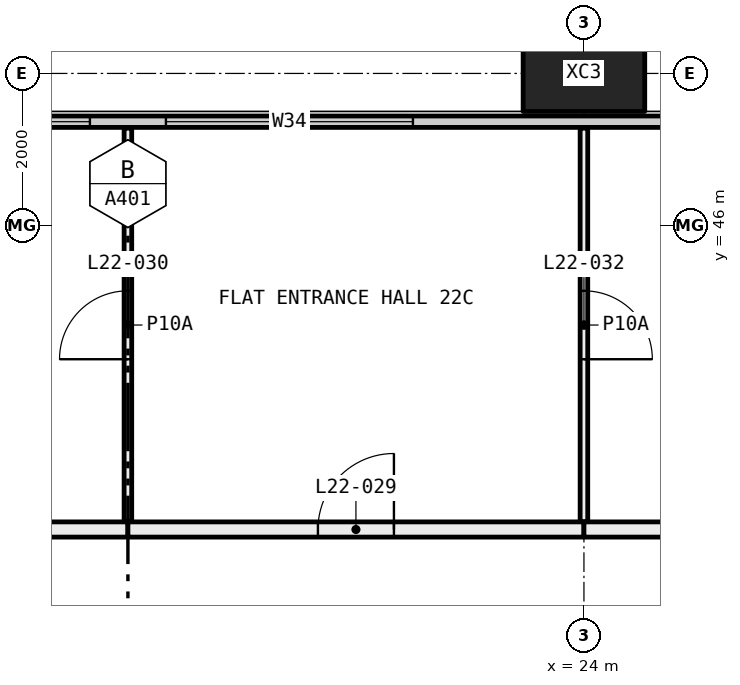
"""IFC4 building model, lengths in metres.
Left out: names, types, materials, properties, quantities, classifications, styles, units other than length and angle.
Written with IfcOpenShell. Run it as: python <this file> out.ifc"""

import sys

from ifc_helpers import new_model, si_unit, direction, frame, frame_2d, origin, origin_2d, place, context, subcontext, project, spatial, rectangle, hollow_rectangle, extrude, element, fill, save


model = new_model("IFC4")
c1 = context("Model", 3, precision=1e-05, world=origin(), true_north=direction((0.0, 1.0)))
c2 = subcontext(c1, "Body", "Model", "MODEL_VIEW")
j1 = project(units=[si_unit("LENGTHUNIT", "METRE"), si_unit("PLANEANGLEUNIT", "RADIAN")], contexts=[c1])
p1 = place(None, origin())
s1 = spatial("IfcSite", under=j1, at=p1, CompositionType="ELEMENT")
p2 = place(p1, origin())
s2 = spatial("IfcBuilding", under=s1, at=p2, CompositionType="ELEMENT")
p3 = place(p2, frame((0.0, 0.0, 88.65)))
s3 = spatial("IfcBuildingStorey", under=s2, at=p3, CompositionType="ELEMENT", Elevation=88.65)
p4 = place(p3, frame((24.0, 48.0, -0.4), z_axis=(0.0, 0.0, 1.0), x_axis=(1.0, 0.0, 0.0)))
e1 = element("IfcColumn", 1, at=p4, inside=s3, PredefinedType="COLUMN", context=c2, shape_type="SweptSolid", body=[
    extrude(hollow_rectangle(XDim=1.6, YDim=1.0, WallThickness=0.065, at=origin_2d()), origin(), (0.0, 0.0, 1.0), 3.45),
])
p5 = place(p3, frame((6.56, 47.365, 0.0), z_axis=(0.0, 0.0, 1.0), x_axis=(1.0, 0.0, 0.0)))
e2 = element("IfcWall", 2, at=p5, inside=s3, PredefinedType="ELEMENTEDWALL", context=c2, shape_type="SweptSolid", body=[
    extrude(rectangle(XDim=58.88, YDim=0.15, at=frame_2d((29.44, 0.0))), origin(), (0.0, 0.0, 1.0), 3.05),
])
p6 = place(p5, frame((0.44, 0.0, 0.45)))
e3 = element("IfcOpeningElement", 3, at=p6, cuts=e2, PredefinedType="OPENING", context=c2, shape_type="SweptSolid", body=[
    extrude(rectangle(XDim=4.5, YDim=2.55, at=frame_2d((2.25, 1.275))), frame((0.0, 0.085, 0.0), z_axis=(0.0, -1.0, 0.0), x_axis=(1.0, 0.0, 0.0)), (0.0, 0.0, 1.0), 0.17),
])
p7 = place(p5, frame((7.69, 0.0, 0.45)))
e4 = element("IfcOpeningElement", 4, at=p7, cuts=e2, PredefinedType="OPENING", context=c2, shape_type="SweptSolid", body=[
    extrude(rectangle(XDim=3.25, YDim=2.55, at=frame_2d((1.625, 1.275))), frame((0.0, 0.085, 0.0), z_axis=(0.0, -1.0, 0.0), x_axis=(1.0, 0.0, 0.0)), (0.0, 0.0, 1.0), 0.17),
])
p8 = place(p5, frame((11.94, 0.0, 0.45)))
e5 = element("IfcOpeningElement", 5, at=p8, cuts=e2, PredefinedType="OPENING", context=c2, shape_type="SweptSolid", body=[
    extrude(rectangle(XDim=3.25, YDim=2.55, at=frame_2d((1.625, 1.275))), frame((0.0, 0.085, 0.0), z_axis=(0.0, -1.0, 0.0), x_axis=(1.0, 0.0, 0.0)), (0.0, 0.0, 1.0), 0.17),
])
p9 = place(p5, frame((19.69, 0.0, 0.45)))
e6 = element("IfcOpeningElement", 6, at=p9, cuts=e2, PredefinedType="OPENING", context=c2, shape_type="SweptSolid", body=[
    extrude(rectangle(XDim=3.25, YDim=2.55, at=frame_2d((1.625, 1.275))), frame((0.0, 0.085, 0.0), z_axis=(0.0, -1.0, 0.0), x_axis=(1.0, 0.0, 0.0)), (0.0, 0.0, 1.0), 0.17),
])
p10 = place(p5, frame((23.94, 0.0, 0.45)))
e7 = element("IfcOpeningElement", 7, at=p10, cuts=e2, PredefinedType="OPENING", context=c2, shape_type="SweptSolid", body=[
    extrude(rectangle(XDim=2.0, YDim=2.55, at=frame_2d((1.0, 1.275))), frame((0.0, 0.085, 0.0), z_axis=(0.0, -1.0, 0.0), x_axis=(1.0, 0.0, 0.0)), (0.0, 0.0, 1.0), 0.17),
])
p11 = place(p5, frame((31.69, 0.0, 0.45)))
e8 = element("IfcOpeningElement", 8, at=p11, cuts=e2, PredefinedType="OPENING", context=c2, shape_type="SweptSolid", body=[
    extrude(rectangle(XDim=3.25, YDim=2.55, at=frame_2d((1.625, 1.275))), frame((0.0, 0.085, 0.0), z_axis=(0.0, -1.0, 0.0), x_axis=(1.0, 0.0, 0.0)), (0.0, 0.0, 1.0), 0.17),
])
p12 = place(p5, frame((35.94, 0.0, 0.45)))
e9 = element("IfcOpeningElement", 9, at=p12, cuts=e2, PredefinedType="OPENING", context=c2, shape_type="SweptSolid", body=[
    extrude(rectangle(XDim=3.25, YDim=2.55, at=frame_2d((1.625, 1.275))), frame((0.0, 0.085, 0.0), z_axis=(0.0, -1.0, 0.0), x_axis=(1.0, 0.0, 0.0)), (0.0, 0.0, 1.0), 0.17),
])
p13 = place(p5, frame((43.69, 0.0, 0.45)))
e10 = element("IfcOpeningElement", 10, at=p13, cuts=e2, PredefinedType="OPENING", context=c2, shape_type="SweptSolid", body=[
    extrude(rectangle(XDim=3.25, YDim=2.55, at=frame_2d((1.625, 1.275))), frame((0.0, 0.085, 0.0), z_axis=(0.0, -1.0, 0.0), x_axis=(1.0, 0.0, 0.0)), (0.0, 0.0, 1.0), 0.17),
])
p14 = place(p5, frame((47.94, 0.0, 0.45)))
e11 = element("IfcOpeningElement", 11, at=p14, cuts=e2, PredefinedType="OPENING", context=c2, shape_type="SweptSolid", body=[
    extrude(rectangle(XDim=2.0, YDim=2.55, at=frame_2d((1.0, 1.275))), frame((0.0, 0.085, 0.0), z_axis=(0.0, -1.0, 0.0), x_axis=(1.0, 0.0, 0.0)), (0.0, 0.0, 1.0), 0.17),
])
p15 = place(p5, frame((53.94, 0.0, 0.45)))
e12 = element("IfcOpeningElement", 12, at=p15, cuts=e2, PredefinedType="OPENING", context=c2, shape_type="SweptSolid", body=[
    extrude(rectangle(XDim=4.5, YDim=2.55, at=frame_2d((2.25, 1.275))), frame((0.0, 0.085, 0.0), z_axis=(0.0, -1.0, 0.0), x_axis=(1.0, 0.0, 0.0)), (0.0, 0.0, 1.0), 0.17),
])
p16 = place(p3, frame((18.0, 42.1, 0.0), z_axis=(0.0, 0.0, 1.0), x_axis=(0.0, 1.0, 0.0)))
e13 = element("IfcWall", 13, at=p16, inside=s3, PredefinedType="PARTITIONING", context=c2, shape_type="SweptSolid", body=[
    extrude(rectangle(XDim=5.18, YDim=0.1, at=frame_2d((2.59, 0.0))), origin(), (0.0, 0.0, 1.0), 3.05),
])
p17 = place(p16, frame((2.14, 0.0, 0.0)))
e14 = element("IfcOpeningElement", 14, at=p17, cuts=e13, PredefinedType="OPENING", context=c2, shape_type="SweptSolid", body=[
    extrude(rectangle(XDim=0.9, YDim=2.1, at=frame_2d((0.45, 1.05))), frame((0.0, 0.06, 0.0), z_axis=(0.0, -1.0, 0.0), x_axis=(1.0, 0.0, 0.0)), (0.0, 0.0, 1.0), 0.12),
])
p18 = place(p3, frame((12.0, 42.0, 0.0), z_axis=(0.0, 0.0, 1.0), x_axis=(1.0, 0.0, 0.0)))
e15 = element("IfcWall", 15, at=p18, inside=s3, PredefinedType="PARTITIONING", context=c2, shape_type="SweptSolid", body=[
    extrude(rectangle(XDim=6.0, YDim=0.2, at=frame_2d((3.0, 0.0))), origin(), (0.0, 0.0, 1.0), 3.05),
])
p19 = place(p3, frame((24.0, 42.1, 0.0), z_axis=(0.0, 0.0, 1.0), x_axis=(0.0, 1.0, 0.0)))
e16 = element("IfcWall", 16, at=p19, inside=s3, PredefinedType="PARTITIONING", context=c2, shape_type="SweptSolid", body=[
    extrude(rectangle(XDim=5.18, YDim=0.1, at=frame_2d((2.59, 0.0))), origin(), (0.0, 0.0, 1.0), 3.05),
])
p20 = place(p19, frame((2.14, 0.0, 0.0)))
e17 = element("IfcOpeningElement", 17, at=p20, cuts=e16, PredefinedType="OPENING", context=c2, shape_type="SweptSolid", body=[
    extrude(rectangle(XDim=0.9, YDim=2.1, at=frame_2d((0.45, 1.05))), frame((0.0, 0.06, 0.0), z_axis=(0.0, -1.0, 0.0), x_axis=(1.0, 0.0, 0.0)), (0.0, 0.0, 1.0), 0.12),
])
p21 = place(p3, frame((18.0, 42.0, 0.0), z_axis=(0.0, 0.0, 1.0), x_axis=(1.0, 0.0, 0.0)))
e18 = element("IfcWall", 18, at=p21, inside=s3, PredefinedType="PARTITIONING", context=c2, shape_type="SweptSolid", body=[
    extrude(rectangle(XDim=6.0, YDim=0.2, at=frame_2d((3.0, 0.0))), origin(), (0.0, 0.0, 1.0), 3.05),
])
p22 = place(p21, frame((2.5, 0.0, 0.0)))
e19 = element("IfcOpeningElement", 19, at=p22, cuts=e18, PredefinedType="OPENING", context=c2, shape_type="SweptSolid", body=[
    extrude(rectangle(XDim=1.0, YDim=2.1, at=frame_2d((0.5, 1.05))), frame((0.0, 0.11, 0.0), z_axis=(0.0, -1.0, 0.0), x_axis=(1.0, 0.0, 0.0)), (0.0, 0.0, 1.0), 0.22),
])
p23 = place(p3, frame((24.0, 42.0, 0.0), z_axis=(0.0, 0.0, 1.0), x_axis=(1.0, 0.0, 0.0)))
e20 = element("IfcWall", 20, at=p23, inside=s3, PredefinedType="PARTITIONING", context=c2, shape_type="SweptSolid", body=[
    extrude(rectangle(XDim=1.9, YDim=0.2, at=frame_2d((0.95, 0.0))), origin(), (0.0, 0.0, 1.0), 3.05),
])
p24 = place(p7, origin())
e21 = element("IfcWindow", 21, at=p24, inside=s3, PartitioningType="SINGLE_PANEL", PredefinedType="WINDOW", context=c2, shape_type="SweptSolid", body=[
    extrude(rectangle(XDim=3.25, YDim=2.55, at=frame_2d((1.625, 1.275))), frame((0.0, 0.03, 0.0), z_axis=(0.0, -1.0, 0.0), x_axis=(1.0, 0.0, 0.0)), (0.0, 0.0, 1.0), 0.06),
])
fill(e4, e21)
p25 = place(p8, origin())
e22 = element("IfcWindow", 22, at=p25, inside=s3, PartitioningType="SINGLE_PANEL", PredefinedType="WINDOW", context=c2, shape_type="SweptSolid", body=[
    extrude(rectangle(XDim=3.25, YDim=2.55, at=frame_2d((1.625, 1.275))), frame((0.0, 0.03, 0.0), z_axis=(0.0, -1.0, 0.0), x_axis=(1.0, 0.0, 0.0)), (0.0, 0.0, 1.0), 0.06),
])
fill(e5, e22)
p26 = place(p22, origin())
e23 = element("IfcDoor", 23, at=p26, inside=s3, OperationType="SINGLE_SWING_LEFT", PredefinedType="DOOR", context=c2, shape_type="SweptSolid", body=[
    extrude(rectangle(XDim=1.0, YDim=2.1, at=frame_2d((0.5, 1.05))), frame((0.0, 0.025, 0.0), z_axis=(0.0, -1.0, 0.0), x_axis=(1.0, 0.0, 0.0)), (0.0, 0.0, 1.0), 0.05),
])
fill(e19, e23)
p27 = place(p17, origin())
e24 = element("IfcDoor", 24, at=p27, inside=s3, OperationType="SINGLE_SWING_RIGHT", PredefinedType="DOOR", context=c2, shape_type="SweptSolid", body=[
    extrude(rectangle(XDim=0.9, YDim=2.1, at=frame_2d((0.45, 1.05))), frame((0.0, 0.025, 0.0), z_axis=(0.0, -1.0, 0.0), x_axis=(1.0, 0.0, 0.0)), (0.0, 0.0, 1.0), 0.05),
])
fill(e14, e24)
p28 = place(p20, frame((0.9, 0.0, 0.0), x_axis=(-1.0, 0.0, 0.0)))
e25 = element("IfcDoor", 25, at=p28, inside=s3, OperationType="SINGLE_SWING_LEFT", PredefinedType="DOOR", context=c2, shape_type="SweptSolid", body=[
    extrude(rectangle(XDim=0.9, YDim=2.1, at=frame_2d((0.45, 1.05))), frame((0.0, 0.025, 0.0), z_axis=(0.0, -1.0, 0.0), x_axis=(1.0, 0.0, 0.0)), (0.0, 0.0, 1.0), 0.05),
])
fill(e17, e25)
save(model, sys.argv[1])
